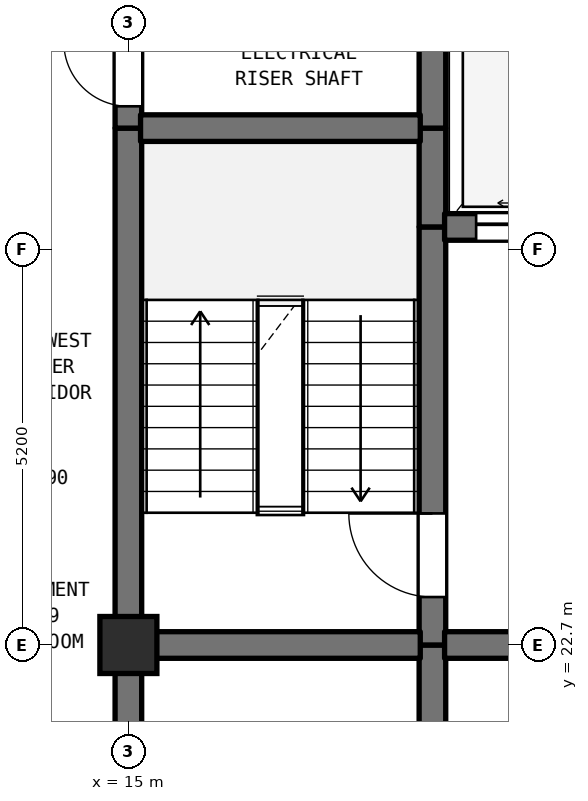
"""IFC4 building model, lengths in metres.
Left out: names, types, materials, properties, quantities, classifications, styles, units other than length and angle.
Written with IfcOpenShell. Run it as: python <this file> out.ifc"""

import sys

from ifc_helpers import new_model, si_unit, direction, frame, frame_2d, origin, origin_2d, place, context, subcontext, project, spatial, rectangle, extrude, element, fill, save


model = new_model("IFC4")
c1 = context("Model", 3, precision=1e-05, world=origin(), true_north=direction((0.0, 1.0)))
c2 = subcontext(c1, "Body", "Model", "MODEL_VIEW")
j1 = project(units=[si_unit("LENGTHUNIT", "METRE"), si_unit("PLANEANGLEUNIT", "RADIAN")], contexts=[c1])
p1 = place(None, origin())
s1 = spatial("IfcSite", under=j1, at=p1, CompositionType="ELEMENT")
p2 = place(p1, origin())
s2 = spatial("IfcBuilding", under=s1, at=p2, CompositionType="ELEMENT")
p3 = place(p2, frame((0.0, 0.0, 222.8)))
s3 = spatial("IfcBuildingStorey", under=s2, at=p3, CompositionType="ELEMENT", Elevation=222.8)
p4 = place(p3, frame((15.0, 22.7, 0.0), z_axis=(0.0, 0.0, 1.0), x_axis=(1.0, 0.0, 0.0)))
e1 = element("IfcColumn", 1, at=p4, inside=s3, PredefinedType="COLUMN", context=c2, shape_type="SweptSolid", body=[
    extrude(rectangle(XDim=0.75, YDim=0.75, at=origin_2d()), origin(), (0.0, 0.0, 1.0), 3.7),
])
p5 = place(p3, frame((15.0, 19.5, 0.0), z_axis=(0.0, 0.0, 1.0), x_axis=(0.0, 1.0, 0.0)))
e2 = element("IfcWall", 2, at=p5, inside=s3, PredefinedType="SHEAR", context=c2, shape_type="SweptSolid", body=[
    extrude(rectangle(XDim=3.2, YDim=0.35, at=frame_2d((1.6, 0.0))), origin(), (0.0, 0.0, 1.0), 3.39),
])
p6 = place(p3, frame((15.0, 22.7, 0.0), z_axis=(0.0, 0.0, 1.0), x_axis=(0.0, 1.0, 0.0)))
e3 = element("IfcWall", 3, at=p6, inside=s3, PredefinedType="SHEAR", context=c2, shape_type="SweptSolid", body=[
    extrude(rectangle(XDim=6.8, YDim=0.35, at=frame_2d((3.4, 0.0))), origin(), (0.0, 0.0, 1.0), 3.39),
])
p7 = place(p3, frame((15.0, 29.5, 0.0), z_axis=(0.0, 0.0, 1.0), x_axis=(0.0, 1.0, 0.0)))
e4 = element("IfcWall", 4, at=p7, inside=s3, PredefinedType="SHEAR", context=c2, shape_type="SweptSolid", body=[
    extrude(rectangle(XDim=1.6, YDim=0.35, at=frame_2d((0.8, 0.0))), origin(), (0.0, 0.0, 1.0), 3.39),
])
p8 = place(p7, frame((0.287, 0.0, 0.0)))
e5 = element("IfcOpeningElement", 5, at=p8, cuts=e4, PredefinedType="OPENING", context=c2, shape_type="SweptSolid", body=[
    extrude(rectangle(XDim=0.85, YDim=2.1, at=frame_2d((0.425, 1.05))), frame((0.0, 0.185, 0.0), z_axis=(0.0, -1.0, 0.0), x_axis=(1.0, 0.0, 0.0)), (0.0, 0.0, 1.0), 0.37),
])
p9 = place(p3, frame((19.0, 19.5, 0.0), z_axis=(0.0, 0.0, 1.0), x_axis=(0.0, 1.0, 0.0)))
e6 = element("IfcWall", 6, at=p9, inside=s3, PredefinedType="SHEAR", context=c2, shape_type="SweptSolid", body=[
    extrude(rectangle(XDim=3.2, YDim=0.35, at=frame_2d((1.6, 0.0))), origin(), (0.0, 0.0, 1.0), 3.39),
])
p10 = place(p3, frame((19.0, 22.7, 0.0), z_axis=(0.0, 0.0, 1.0), x_axis=(0.0, 1.0, 0.0)))
e7 = element("IfcWall", 7, at=p10, inside=s3, PredefinedType="SHEAR", context=c2, shape_type="SweptSolid", body=[
    extrude(rectangle(XDim=5.5, YDim=0.35, at=frame_2d((2.75, 0.0))), origin(), (0.0, 0.0, 1.0), 3.39),
])
p11 = place(p10, frame((0.631, 0.0, 0.0)))
e8 = element("IfcOpeningElement", 8, at=p11, cuts=e7, PredefinedType="OPENING", context=c2, shape_type="SweptSolid", body=[
    extrude(rectangle(XDim=1.1, YDim=2.15, at=frame_2d((0.55, 1.075))), frame((0.0, 0.185, 0.0), z_axis=(0.0, -1.0, 0.0), x_axis=(1.0, 0.0, 0.0)), (0.0, 0.0, 1.0), 0.37),
])
p12 = place(p3, frame((19.0, 28.2, 0.0), z_axis=(0.0, 0.0, 1.0), x_axis=(0.0, 1.0, 0.0)))
e9 = element("IfcWall", 9, at=p12, inside=s3, PredefinedType="SHEAR", context=c2, shape_type="SweptSolid", body=[
    extrude(rectangle(XDim=1.3, YDim=0.35, at=frame_2d((0.65, 0.0))), origin(), (0.0, 0.0, 1.0), 3.39),
])
p13 = place(p3, frame((19.0, 29.5, 0.0), z_axis=(0.0, 0.0, 1.0), x_axis=(0.0, 1.0, 0.0)))
e10 = element("IfcWall", 10, at=p13, inside=s3, PredefinedType="SHEAR", context=c2, shape_type="SweptSolid", body=[
    extrude(rectangle(XDim=5.5, YDim=0.35, at=frame_2d((2.75, 0.0))), origin(), (0.0, 0.0, 1.0), 3.39),
])
p14 = place(p13, frame((2.025, 0.0, 0.0)))
e11 = element("IfcOpeningElement", 11, at=p14, cuts=e10, PredefinedType="OPENING", context=c2, shape_type="SweptSolid", body=[
    extrude(rectangle(XDim=1.1, YDim=2.15, at=frame_2d((0.55, 1.075))), frame((0.0, 0.185, 0.0), z_axis=(0.0, -1.0, 0.0), x_axis=(1.0, 0.0, 0.0)), (0.0, 0.0, 1.0), 0.37),
])
p15 = place(p3, frame((15.16, 22.7, 0.0), z_axis=(0.0, 0.0, 1.0), x_axis=(1.0, 0.0, 0.0)))
e12 = element("IfcWall", 12, at=p15, inside=s3, PredefinedType="SHEAR", context=c2, shape_type="SweptSolid", body=[
    extrude(rectangle(XDim=3.68, YDim=0.35, at=frame_2d((1.84, 0.0))), origin(), (0.0, 0.0, 1.0), 3.39),
])
p16 = place(p3, frame((19.16, 22.7, 0.0), z_axis=(0.0, 0.0, 1.0), x_axis=(1.0, 0.0, 0.0)))
e13 = element("IfcWall", 13, at=p16, inside=s3, PredefinedType="SHEAR", context=c2, shape_type="SweptSolid", body=[
    extrude(rectangle(XDim=4.48, YDim=0.35, at=frame_2d((2.24, 0.0))), origin(), (0.0, 0.0, 1.0), 3.39),
])
p17 = place(p16, frame((1.64, 0.0, 0.0)))
e14 = element("IfcOpeningElement", 14, at=p17, cuts=e13, PredefinedType="OPENING", context=c2, shape_type="SweptSolid", body=[
    extrude(rectangle(XDim=1.2, YDim=2.2, at=frame_2d((0.6, 1.1))), frame((0.0, 0.185, 0.0), z_axis=(0.0, -1.0, 0.0), x_axis=(1.0, 0.0, 0.0)), (0.0, 0.0, 1.0), 0.37),
])
p18 = place(p3, frame((19.16, 28.2, 0.0), z_axis=(0.0, 0.0, 1.0), x_axis=(1.0, 0.0, 0.0)))
e15 = element("IfcWall", 15, at=p18, inside=s3, PredefinedType="SHEAR", context=c2, shape_type="SweptSolid", body=[
    extrude(rectangle(XDim=4.48, YDim=0.35, at=frame_2d((2.24, 0.0))), origin(), (0.0, 0.0, 1.0), 3.39),
])
p19 = place(p18, frame((0.415, 0.0, 0.0)))
e16 = element("IfcOpeningElement", 16, at=p19, cuts=e15, PredefinedType="OPENING", context=c2, shape_type="SweptSolid", body=[
    extrude(rectangle(XDim=1.25, YDim=2.2, at=frame_2d((0.625, 1.1))), frame((0.0, 0.185, 0.0), z_axis=(0.0, -1.0, 0.0), x_axis=(1.0, 0.0, 0.0)), (0.0, 0.0, 1.0), 0.37),
])
p20 = place(p18, frame((2.815, 0.0, 0.0)))
e17 = element("IfcOpeningElement", 17, at=p20, cuts=e15, PredefinedType="OPENING", context=c2, shape_type="SweptSolid", body=[
    extrude(rectangle(XDim=1.25, YDim=2.2, at=frame_2d((0.625, 1.1))), frame((0.0, 0.185, 0.0), z_axis=(0.0, -1.0, 0.0), x_axis=(1.0, 0.0, 0.0)), (0.0, 0.0, 1.0), 0.37),
])
p21 = place(p3, frame((15.16, 29.5, 0.0), z_axis=(0.0, 0.0, 1.0), x_axis=(1.0, 0.0, 0.0)))
e18 = element("IfcWall", 18, at=p21, inside=s3, PredefinedType="SHEAR", context=c2, shape_type="SweptSolid", body=[
    extrude(rectangle(XDim=3.68, YDim=0.35, at=frame_2d((1.84, 0.0))), origin(), (0.0, 0.0, 1.0), 3.39),
])
p22 = place(p8, origin())
e19 = element("IfcDoor", 19, at=p22, inside=s3, OperationType="SINGLE_SWING_RIGHT", PredefinedType="DOOR", context=c2, shape_type="SweptSolid", body=[
    extrude(rectangle(XDim=0.85, YDim=2.1, at=frame_2d((0.425, 1.05))), frame((0.0, 0.025, 0.0), z_axis=(0.0, -1.0, 0.0), x_axis=(1.0, 0.0, 0.0)), (0.0, 0.0, 1.0), 0.05),
])
fill(e5, e19)
p23 = place(p11, origin())
e20 = element("IfcDoor", 20, at=p23, inside=s3, OperationType="SINGLE_SWING_RIGHT", PredefinedType="DOOR", context=c2, shape_type="SweptSolid", body=[
    extrude(rectangle(XDim=1.1, YDim=2.15, at=frame_2d((0.55, 1.075))), frame((0.0, 0.025, 0.0), z_axis=(0.0, -1.0, 0.0), x_axis=(1.0, 0.0, 0.0)), (0.0, 0.0, 1.0), 0.05),
])
fill(e8, e20)
p24 = place(p19, origin())
e21 = element("IfcDoor", 21, at=p24, inside=s3, OperationType="DOUBLE_DOOR_SLIDING", PredefinedType="DOOR", context=c2, shape_type="SweptSolid", body=[
    extrude(rectangle(XDim=1.25, YDim=2.2, at=frame_2d((0.625, 1.1))), frame((0.0, 0.025, 0.0), z_axis=(0.0, -1.0, 0.0), x_axis=(1.0, 0.0, 0.0)), (0.0, 0.0, 1.0), 0.05),
])
fill(e16, e21)
save(model, sys.argv[1])
